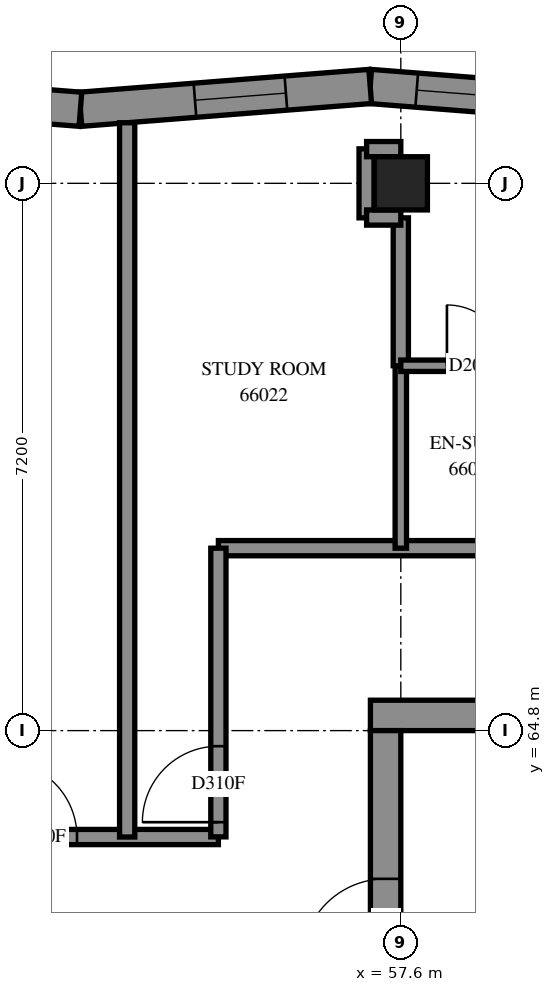
"""IFC4 building model, lengths in metres.
Left out: names, types, materials, properties, quantities, classifications, styles, units other than length and angle.
Written with IfcOpenShell. Run it as: python <this file> out.ifc"""

import sys

from ifc_helpers import new_model, si_unit, direction, frame, frame_2d, origin, origin_2d, place, context, subcontext, project, spatial, polyline, rectangle, outline, extrude, element, fill, save


model = new_model("IFC4")
c1 = context("Model", 3, precision=1e-05, world=origin(), true_north=direction((0.0, 1.0)))
c2 = subcontext(c1, "Body", "Model", "MODEL_VIEW")
j1 = project(units=[si_unit("LENGTHUNIT", "METRE"), si_unit("PLANEANGLEUNIT", "RADIAN")], contexts=[c1])
p1 = place(None, origin())
s1 = spatial("IfcSite", under=j1, at=p1, CompositionType="ELEMENT")
p2 = place(p1, origin())
s2 = spatial("IfcBuilding", under=s1, at=p2, CompositionType="ELEMENT")
p3 = place(p2, frame((0.0, 0.0, 243.8)))
s3 = spatial("IfcBuildingStorey", under=s2, at=p3, CompositionType="ELEMENT", Elevation=243.8)
p4 = place(p3, frame((57.6, 72.0, 0.0), z_axis=(0.0, 0.0, 1.0), x_axis=(1.0, 0.0, 0.0)))
e1 = element("IfcColumn", 1, at=p4, inside=s3, PredefinedType="COLUMN", context=c2, shape_type="SweptSolid", body=[
    extrude(rectangle(XDim=0.7, YDim=0.7, at=origin_2d()), origin(), (0.0, 0.0, 1.0), 3.1),
])
p5 = place(p3, frame((57.2, 65.0, -0.3), z_axis=(0.0, 0.0, 1.0), x_axis=(1.0, 0.0, 0.0)))
e2 = element("IfcWall", 2, at=p5, inside=s3, PredefinedType="SHEAR", context=c2, shape_type="SweptSolid", body=[
    extrude(rectangle(XDim=15.2, YDim=0.4, at=frame_2d((7.6, 0.0))), origin(), (0.0, 0.0, 1.0), 2.7),
])
p6 = place(p5, frame((10.4, 0.0, 0.3)))
e3 = element("IfcOpeningElement", 3, at=p6, cuts=e2, PredefinedType="OPENING", context=c2, shape_type="SweptSolid", body=[
    extrude(rectangle(XDim=0.8, YDim=2.1, at=frame_2d((0.4, 1.05))), frame((0.0, 0.21, 0.0), z_axis=(0.0, -1.0, 0.0), x_axis=(1.0, 0.0, 0.0)), (0.0, 0.0, 1.0), 0.42),
])
p7 = place(p3, frame((57.4, 50.4, -0.3), z_axis=(0.0, 0.0, 1.0), x_axis=(0.0, 1.0, 0.0)))
e4 = element("IfcWall", 4, at=p7, inside=s3, PredefinedType="SHEAR", context=c2, shape_type="SweptSolid", body=[
    extrude(rectangle(XDim=14.4, YDim=0.4, at=frame_2d((7.2, 0.0))), origin(), (0.0, 0.0, 1.0), 2.7),
])
p8 = place(p7, frame((4.55, 0.0, 0.3)))
e5 = element("IfcOpeningElement", 5, at=p8, cuts=e4, PredefinedType="OPENING", context=c2, shape_type="SweptSolid", body=[
    extrude(rectangle(XDim=1.1, YDim=2.1, at=frame_2d((0.55, 1.05))), frame((0.0, 0.21, 0.0), z_axis=(0.0, -1.0, 0.0), x_axis=(1.0, 0.0, 0.0)), (0.0, 0.0, 1.0), 0.42),
])
p9 = place(p7, frame((11.35, 0.0, 0.3)))
e6 = element("IfcOpeningElement", 6, at=p9, cuts=e4, PredefinedType="OPENING", context=c2, shape_type="SweptSolid", body=[
    extrude(rectangle(XDim=1.1, YDim=2.1, at=frame_2d((0.55, 1.05))), frame((0.0, 0.21, 0.0), z_axis=(0.0, -1.0, 0.0), x_axis=(1.0, 0.0, 0.0)), (0.0, 0.0, 1.0), 0.42),
])
p10 = place(p3, frame((61.009, 72.974, 0.0), z_axis=(0.0, 0.0, 1.0), x_axis=(-0.9969177178, 0.0784542156, 0.0)))
e7 = element("IfcWall", 7, at=p10, inside=s3, PredefinedType="SOLIDWALL", context=c2, shape_type="SweptSolid", body=[
    extrude(outline(polyline([(0.018, -0.225), (3.842, -0.225), (3.806, 0.225), (-0.018, 0.225), (0.018, -0.225)])), origin(), (0.0, 0.0, 1.0), 3.1),
])
p11 = place(p10, frame((0.41, 0.0, 0.45)))
e8 = element("IfcOpeningElement", 8, at=p11, cuts=e7, PredefinedType="OPENING", context=c2, shape_type="SweptSolid", body=[
    extrude(rectangle(XDim=2.8, YDim=2.55, at=frame_2d((1.4, 1.275))), frame((0.0, 0.235, 0.0), z_axis=(0.0, -1.0, 0.0), x_axis=(1.0, 0.0, 0.0)), (0.0, 0.0, 1.0), 0.47),
])
p12 = place(p3, frame((57.197, 73.274, 0.0), z_axis=(0.0, 0.0, 1.0), x_axis=(-0.9969178788, -0.0784521703, 0.0)))
e9 = element("IfcWall", 9, at=p12, inside=s3, PredefinedType="SOLIDWALL", context=c2, shape_type="SweptSolid", body=[
    extrude(outline(polyline([(-0.018, -0.225), (3.806, -0.225), (3.842, 0.225), (0.018, 0.225), (-0.018, -0.225)])), origin(), (0.0, 0.0, 1.0), 3.1),
])
p13 = place(p12, frame((1.112, 0.0, 0.45)))
e10 = element("IfcOpeningElement", 10, at=p13, cuts=e9, PredefinedType="OPENING", context=c2, shape_type="SweptSolid", body=[
    extrude(rectangle(XDim=1.2, YDim=2.55, at=frame_2d((0.6, 1.275))), frame((0.0, 0.235, 0.0), z_axis=(0.0, -1.0, 0.0), x_axis=(1.0, 0.0, 0.0)), (0.0, 0.0, 1.0), 0.47),
])
p14 = place(p3, frame((53.385, 72.974, 0.0), z_axis=(0.0, 0.0, 1.0), x_axis=(-0.9969177178, 0.0784542156, 0.0)))
e11 = element("IfcWall", 11, at=p14, inside=s3, PredefinedType="SOLIDWALL", context=c2, shape_type="SweptSolid", body=[
    extrude(outline(polyline([(0.018, -0.225), (3.842, -0.225), (3.806, 0.225), (-0.018, 0.225), (0.018, -0.225)])), origin(), (0.0, 0.0, 1.0), 3.1),
])
p15 = place(p14, frame((0.997, 0.0, 0.45)))
e12 = element("IfcOpeningElement", 12, at=p15, cuts=e11, PredefinedType="OPENING", context=c2, shape_type="SweptSolid", body=[
    extrude(rectangle(XDim=1.2, YDim=2.55, at=frame_2d((0.6, 1.275))), frame((0.0, 0.235, 0.0), z_axis=(0.0, -1.0, 0.0), x_axis=(1.0, 0.0, 0.0)), (0.0, 0.0, 1.0), 0.47),
])
p16 = place(p3, frame((55.2, 67.2, 0.0), z_axis=(0.0, 0.0, 1.0), x_axis=(1.0, 0.0, 0.0)))
e13 = element("IfcWall", 13, at=p16, inside=s3, PredefinedType="PARTITIONING", context=c2, shape_type="SweptSolid", body=[
    extrude(rectangle(XDim=19.2, YDim=0.2, at=frame_2d((9.6, 0.0))), origin(), (0.0, 0.0, 1.0), 3.1),
])
p17 = place(p16, frame((6.149, 0.0, 0.0)))
e14 = element("IfcOpeningElement", 14, at=p17, cuts=e13, PredefinedType="OPENING", context=c2, shape_type="SweptSolid", body=[
    extrude(rectangle(XDim=0.9, YDim=2.1, at=frame_2d((0.45, 1.05))), frame((0.0, 0.11, 0.0), z_axis=(0.0, -1.0, 0.0), x_axis=(1.0, 0.0, 0.0)), (0.0, 0.0, 1.0), 0.22),
])
p18 = place(p16, frame((13.499, 0.0, 0.0)))
e15 = element("IfcOpeningElement", 15, at=p18, cuts=e13, PredefinedType="OPENING", context=c2, shape_type="SweptSolid", body=[
    extrude(rectangle(XDim=0.9, YDim=2.1, at=frame_2d((0.45, 1.05))), frame((0.0, 0.11, 0.0), z_axis=(0.0, -1.0, 0.0), x_axis=(1.0, 0.0, 0.0)), (0.0, 0.0, 1.0), 0.22),
])
p19 = place(p3, frame((40.61, 63.4, 0.0), z_axis=(0.0, 0.0, 1.0), x_axis=(1.0, 0.0, 0.0)))
e16 = element("IfcWall", 16, at=p19, inside=s3, PredefinedType="PARTITIONING", context=c2, shape_type="SweptSolid", body=[
    extrude(rectangle(XDim=14.59, YDim=0.2, at=frame_2d((7.295, 0.0))), origin(), (0.0, 0.0, 1.0), 3.1),
])
p20 = place(p19, frame((6.3, 0.0, 0.0)))
e17 = element("IfcOpeningElement", 17, at=p20, cuts=e16, PredefinedType="OPENING", context=c2, shape_type="SweptSolid", body=[
    extrude(rectangle(XDim=1.0, YDim=2.1, at=frame_2d((0.5, 1.05))), frame((0.0, 0.11, 0.0), z_axis=(0.0, -1.0, 0.0), x_axis=(1.0, 0.0, 0.0)), (0.0, 0.0, 1.0), 0.22),
])
p21 = place(p19, frame((11.73, 0.0, 0.0)))
e18 = element("IfcOpeningElement", 18, at=p21, cuts=e16, PredefinedType="OPENING", context=c2, shape_type="SweptSolid", body=[
    extrude(rectangle(XDim=1.0, YDim=2.1, at=frame_2d((0.5, 1.05))), frame((0.0, 0.11, 0.0), z_axis=(0.0, -1.0, 0.0), x_axis=(1.0, 0.0, 0.0)), (0.0, 0.0, 1.0), 0.22),
])
p22 = place(p3, frame((54.0, 63.4, 0.0), z_axis=(0.0, 0.0, 1.0), x_axis=(0.0, 1.0, 0.0)))
e19 = element("IfcWall", 19, at=p22, inside=s3, PredefinedType="PARTITIONING", context=c2, shape_type="SweptSolid", body=[
    extrude(rectangle(XDim=9.397, YDim=0.2, at=frame_2d((4.699, 0.0))), origin(), (0.0, 0.0, 1.0), 3.1),
])
p23 = place(p3, frame((55.2, 63.402, 0.0), z_axis=(0.0, 0.0, 1.0), x_axis=(0.0, 1.0, 0.0)))
e20 = element("IfcWall", 20, at=p23, inside=s3, PredefinedType="PARTITIONING", context=c2, shape_type="SweptSolid", body=[
    extrude(rectangle(XDim=3.798, YDim=0.2, at=frame_2d((1.899, 0.0))), origin(), (0.0, 0.0, 1.0), 3.1),
])
p24 = place(p23, frame((0.193, 0.0, 0.0)))
e21 = element("IfcOpeningElement", 21, at=p24, cuts=e20, PredefinedType="OPENING", context=c2, shape_type="SweptSolid", body=[
    extrude(rectangle(XDim=1.0, YDim=2.1, at=frame_2d((0.5, 1.05))), frame((0.0, 0.11, 0.0), z_axis=(0.0, -1.0, 0.0), x_axis=(1.0, 0.0, 0.0)), (0.0, 0.0, 1.0), 0.22),
])
p25 = place(p3, frame((57.6, 67.2, 0.0), z_axis=(0.0, 0.0, 1.0), x_axis=(0.0, 1.0, 0.0)))
e22 = element("IfcWall", 22, at=p25, inside=s3, PredefinedType="PARTITIONING", context=c2, shape_type="SweptSolid", body=[
    extrude(rectangle(XDim=2.4, YDim=0.15, at=frame_2d((1.2, 0.0))), origin(), (0.0, 0.0, 1.0), 3.1),
])
p26 = place(p3, frame((57.6, 69.6, 0.0), z_axis=(0.0, 0.0, 1.0), x_axis=(0.0, 1.0, 0.0)))
e23 = element("IfcWall", 23, at=p26, inside=s3, PredefinedType="PARTITIONING", context=c2, shape_type="SweptSolid", body=[
    extrude(rectangle(XDim=1.946, YDim=0.2, at=frame_2d((0.973, 0.0))), origin(), (0.0, 0.0, 1.0), 3.1),
])
p27 = place(p3, frame((57.6, 69.6, 0.0), z_axis=(0.0, 0.0, 1.0), x_axis=(1.0, 0.0, 0.0)))
e24 = element("IfcWall", 24, at=p27, inside=s3, PredefinedType="PARTITIONING", context=c2, shape_type="SweptSolid", body=[
    extrude(rectangle(XDim=1.9, YDim=0.15, at=frame_2d((0.95, 0.0))), origin(), (0.0, 0.0, 1.0), 3.1),
])
p28 = place(p27, frame((0.607, 0.0, 0.0)))
e25 = element("IfcOpeningElement", 25, at=p28, cuts=e24, PredefinedType="OPENING", context=c2, shape_type="SweptSolid", body=[
    extrude(rectangle(XDim=0.8, YDim=2.1, at=frame_2d((0.4, 1.05))), frame((0.0, 0.085, 0.0), z_axis=(0.0, -1.0, 0.0), x_axis=(1.0, 0.0, 0.0)), (0.0, 0.0, 1.0), 0.17),
])
p29 = place(p3, frame((57.15, 71.546, 0.0), z_axis=(0.0, 0.0, 1.0), x_axis=(0.0, 1.0, 0.0)))
e26 = element("IfcWall", 26, at=p29, inside=s3, PredefinedType="PARTITIONING", context=c2, shape_type="SweptSolid", body=[
    extrude(rectangle(XDim=0.908, YDim=0.2, at=frame_2d((0.454, 0.0))), origin(), (0.0, 0.0, 1.0), 3.1),
])
for number, where, z_axis, x_axis in (
    (27, (57.15, 72.45, 0.0), (0.0, 0.0, 1.0), (1.0, 0.0, 0.0)),
    (28, (57.15, 71.55, 0.0), (0.0, 0.0, 1.0), (1.0, 0.0, 0.0)),
):
    element("IfcWall", number, at=place(p3, frame(where, z_axis=z_axis, x_axis=x_axis)), inside=s3, PredefinedType="PARTITIONING", context=c2, shape_type="SweptSolid", body=[
        extrude(rectangle(XDim=0.45, YDim=0.2, at=frame_2d((0.225, 0.0))), origin(), (0.0, 0.0, 1.0), 3.1),
    ])
p30 = place(p11, origin())
e29 = element("IfcWindow", 29, at=p30, inside=s3, PartitioningType="SINGLE_PANEL", PredefinedType="WINDOW", context=c2, shape_type="SweptSolid", body=[
    extrude(rectangle(XDim=2.8, YDim=2.55, at=frame_2d((1.4, 1.275))), frame((0.0, 0.205, 0.0), z_axis=(0.0, -1.0, 0.0), x_axis=(1.0, 0.0, 0.0)), (0.0, 0.0, 1.0), 0.06),
])
fill(e8, e29)
p31 = place(p13, origin())
e30 = element("IfcWindow", 30, at=p31, inside=s3, PartitioningType="SINGLE_PANEL", PredefinedType="WINDOW", context=c2, shape_type="SweptSolid", body=[
    extrude(rectangle(XDim=1.2, YDim=2.55, at=frame_2d((0.6, 1.275))), frame((0.0, 0.205, 0.0), z_axis=(0.0, -1.0, 0.0), x_axis=(1.0, 0.0, 0.0)), (0.0, 0.0, 1.0), 0.06),
])
fill(e10, e30)
p32 = place(p9, origin())
e31 = element("IfcDoor", 31, at=p32, inside=s3, OperationType="SINGLE_SWING_LEFT", PredefinedType="DOOR", context=c2, shape_type="SweptSolid", body=[
    extrude(rectangle(XDim=1.1, YDim=2.1, at=frame_2d((0.55, 1.05))), frame((0.0, 0.025, 0.0), z_axis=(0.0, -1.0, 0.0), x_axis=(1.0, 0.0, 0.0)), (0.0, 0.0, 1.0), 0.05),
])
fill(e6, e31)
p33 = place(p21, origin())
e32 = element("IfcDoor", 32, at=p33, inside=s3, OperationType="SINGLE_SWING_RIGHT", PredefinedType="DOOR", context=c2, shape_type="SweptSolid", body=[
    extrude(rectangle(XDim=1.0, YDim=2.1, at=frame_2d((0.5, 1.05))), frame((0.0, 0.025, 0.0), z_axis=(0.0, -1.0, 0.0), x_axis=(1.0, 0.0, 0.0)), (0.0, 0.0, 1.0), 0.05),
])
fill(e18, e32)
p34 = place(p24, origin())
e33 = element("IfcDoor", 33, at=p34, inside=s3, OperationType="SINGLE_SWING_LEFT", PredefinedType="DOOR", context=c2, shape_type="SweptSolid", body=[
    extrude(rectangle(XDim=1.0, YDim=2.1, at=frame_2d((0.5, 1.05))), frame((0.0, 0.025, 0.0), z_axis=(0.0, -1.0, 0.0), x_axis=(1.0, 0.0, 0.0)), (0.0, 0.0, 1.0), 0.05),
])
fill(e21, e33)
p35 = place(p28, origin())
e34 = element("IfcDoor", 34, at=p35, inside=s3, OperationType="SINGLE_SWING_RIGHT", PredefinedType="DOOR", context=c2, shape_type="SweptSolid", body=[
    extrude(rectangle(XDim=0.8, YDim=2.1, at=frame_2d((0.4, 1.05))), frame((0.0, 0.025, 0.0), z_axis=(0.0, -1.0, 0.0), x_axis=(1.0, 0.0, 0.0)), (0.0, 0.0, 1.0), 0.05),
])
fill(e25, e34)
save(model, sys.argv[1])
